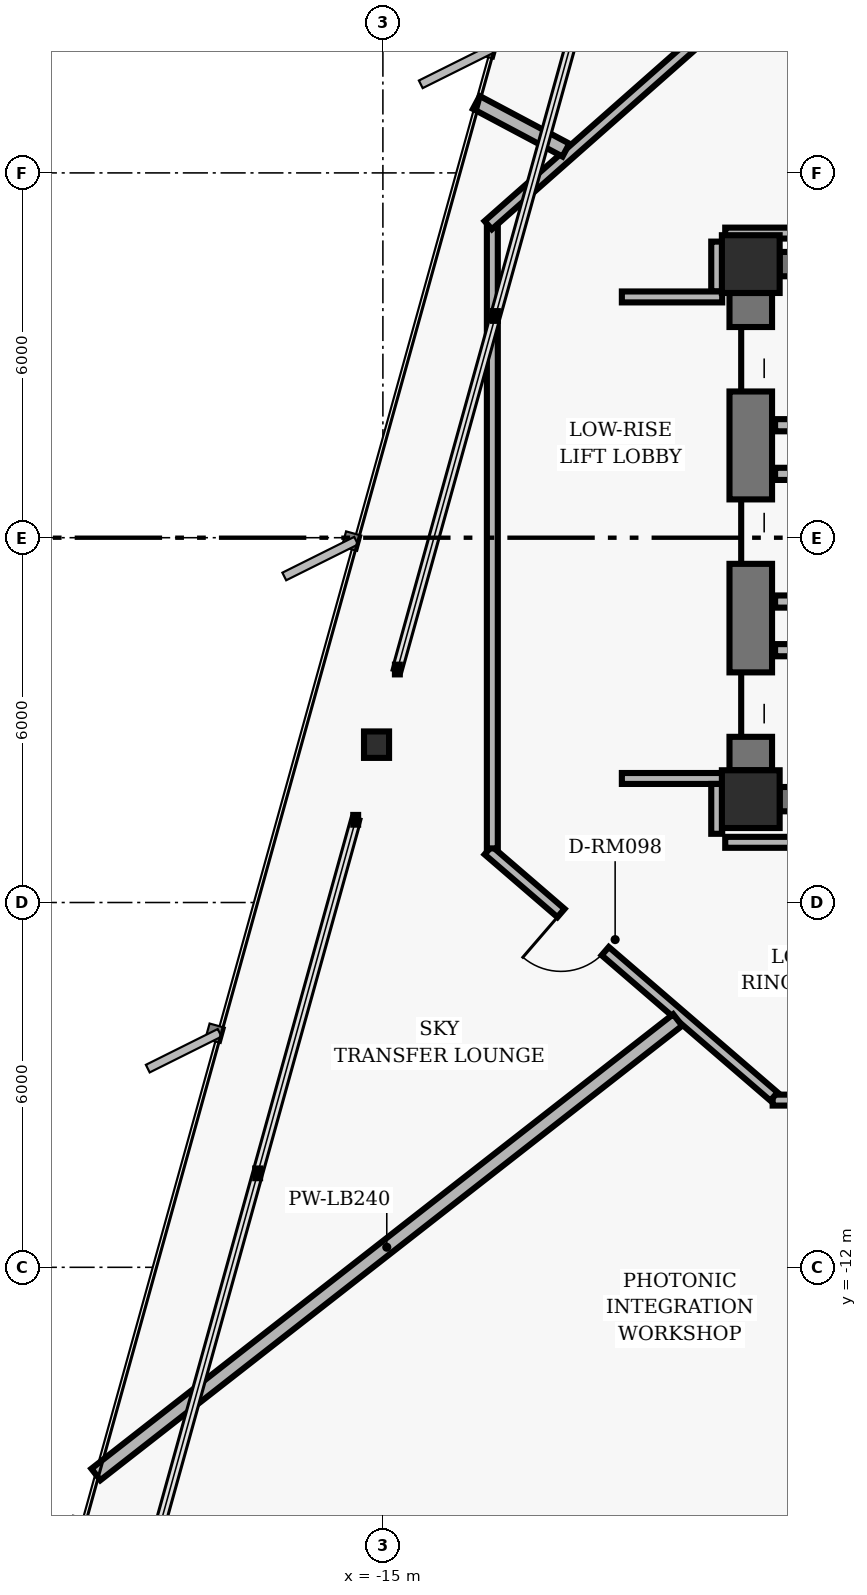
"""IFC4 building model, lengths in metres.
Left out: names, types, materials, properties, quantities, classifications, styles, units other than length and angle.
Written with IfcOpenShell. Run it as: python <this file> out.ifc"""

import sys

from ifc_helpers import new_model, si_unit, direction, frame, frame_2d, origin, origin_2d, place, context, subcontext, project, spatial, rectangle, hollow_rectangle, i_section, extrude, element, fill, save


model = new_model("IFC4")
c1 = context("Model", 3, precision=1e-05, world=origin(), true_north=direction((0.0, 1.0)))
c2 = subcontext(c1, "Body", "Model", "MODEL_VIEW")
j1 = project(units=[si_unit("LENGTHUNIT", "METRE"), si_unit("PLANEANGLEUNIT", "RADIAN")], contexts=[c1])
p1 = place(None, origin())
s1 = spatial("IfcSite", under=j1, at=p1, CompositionType="ELEMENT")
p2 = place(p1, origin())
s2 = spatial("IfcBuilding", under=s1, at=p2, CompositionType="ELEMENT")
p3 = place(p2, frame((0.0, 0.0, 97.76)))
s3 = spatial("IfcBuildingStorey", under=s2, at=p3, CompositionType="ELEMENT", Elevation=97.76)
for number, where, z_axis, x_axis in (
    (1, (-8.95, 4.5, 0.0), (0.0, 0.0, 1.0), (1.0, 0.0, 0.0)),
    (2, (-8.95, -4.3, 0.0), (0.0, 0.0, 1.0), (1.0, 0.0, 0.0)),
):
    element("IfcColumn", number, at=place(p3, frame(where, z_axis=z_axis, x_axis=x_axis)), inside=s3, PredefinedType="COLUMN", context=c2, shape_type="SweptSolid", body=[
        extrude(hollow_rectangle(XDim=0.95, YDim=0.95, WallThickness=0.06, InnerFilletRadius=0.02, OuterFilletRadius=0.04, at=origin_2d()), origin(), (0.0, 0.0, 1.0), 3.04),
    ])
p4 = place(p3, frame((-8.95, -3.825, 0.0), z_axis=(0.0, 0.0, 1.0), x_axis=(0.0, 1.0, 0.0)))
e3 = element("IfcWall", 3, at=p4, inside=s3, PredefinedType="SHEAR", context=c2, shape_type="SweptSolid", body=[
    extrude(rectangle(XDim=7.85, YDim=0.7, at=frame_2d((3.925, 0.0))), origin(), (0.0, 0.0, 1.0), 2.718),
])
p5 = place(p4, frame((0.55, 0.0, 0.0)))
e4 = element("IfcOpeningElement", 4, at=p5, cuts=e3, PredefinedType="OPENING", context=c2, shape_type="SweptSolid", body=[
    extrude(rectangle(XDim=1.06, YDim=2.04, at=frame_2d((0.53, 1.02))), frame((0.0, 0.36, 0.0), z_axis=(0.0, -1.0, 0.0), x_axis=(1.0, 0.0, 0.0)), (0.0, 0.0, 1.0), 0.72),
])
p6 = place(p4, frame((3.395, 0.0, 0.0)))
e5 = element("IfcOpeningElement", 5, at=p6, cuts=e3, PredefinedType="OPENING", context=c2, shape_type="SweptSolid", body=[
    extrude(rectangle(XDim=1.06, YDim=2.04, at=frame_2d((0.53, 1.02))), frame((0.0, 0.36, 0.0), z_axis=(0.0, -1.0, 0.0), x_axis=(1.0, 0.0, 0.0)), (0.0, 0.0, 1.0), 0.72),
])
p7 = place(p4, frame((6.23, 0.0, 0.0)))
e6 = element("IfcOpeningElement", 6, at=p7, cuts=e3, PredefinedType="OPENING", context=c2, shape_type="SweptSolid", body=[
    extrude(rectangle(XDim=1.06, YDim=2.04, at=frame_2d((0.53, 1.02))), frame((0.0, 0.36, 0.0), z_axis=(0.0, -1.0, 0.0), x_axis=(1.0, 0.0, 0.0)), (0.0, 0.0, 1.0), 0.72),
])
for number, where, z_axis, x_axis in (
    (7, (-8.475, 4.5, 0.0), (0.0, 0.0, 1.0), (1.0, 0.0, 0.0)),
    (8, (-8.475, -4.3, 0.0), (0.0, 0.0, 1.0), (1.0, 0.0, 0.0)),
):
    element("IfcWall", number, at=place(p3, frame(where, z_axis=z_axis, x_axis=x_axis)), inside=s3, PredefinedType="SHEAR", context=c2, shape_type="SweptSolid", body=[
        extrude(rectangle(XDim=1.95, YDim=0.4, at=frame_2d((0.975, 0.0))), origin(), (0.0, 0.0, 1.0), 2.718),
    ])
p8 = place(p3, frame((-15.104, -3.404, 0.0), z_axis=(0.0, 0.0, 1.0), x_axis=(1.0, 0.0, 0.0)))
e9 = element("IfcColumn", 9, at=p8, inside=s3, PredefinedType="COLUMN", context=c2, shape_type="SweptSolid", body=[
    extrude(i_section(OverallWidth=0.412, OverallDepth=0.435, WebThickness=0.036, FlangeThickness=0.057, FilletRadius=0.022, at=origin_2d()), origin(), (0.0, 0.0, 1.0), 3.04),
])
for number, where, z_axis, x_axis in (
    (10, (-8.55, -1.85, 0.0), (0.0, 0.0, 1.0), (1.0, 0.0, 0.0)),
    (11, (-8.55, 1.85, 0.0), (0.0, 0.0, 1.0), (1.0, 0.0, 0.0)),
):
    element("IfcWall", number, at=place(p3, frame(where, z_axis=z_axis, x_axis=x_axis)), inside=s3, PredefinedType="PARTITIONING", context=c2, shape_type="SweptSolid", body=[
        extrude(rectangle(XDim=2.1, YDim=0.2, at=frame_2d((1.05, 0.0))), origin(), (0.0, 0.0, 1.0), 2.693),
    ])
for number, where, z_axis, x_axis in (
    (12, (-8.55, -1.05, 0.0), (0.0, 0.0, 1.0), (1.0, 0.0, 0.0)),
    (13, (-8.55, 1.05, 0.0), (0.0, 0.0, 1.0), (1.0, 0.0, 0.0)),
):
    element("IfcWall", number, at=place(p3, frame(where, z_axis=z_axis, x_axis=x_axis)), inside=s3, PredefinedType="PARTITIONING", context=c2, shape_type="SweptSolid", body=[
        extrude(rectangle(XDim=1.91, YDim=0.2, at=frame_2d((0.955, 0.0))), origin(), (0.0, 0.0, 1.0), 2.693),
    ])
p9 = place(p3, frame((8.41, -9.25, 0.0), z_axis=(0.0, 0.0, 1.0), x_axis=(-1.0, 0.0, 0.0)))
e14 = element("IfcWall", 14, at=p9, inside=s3, PredefinedType="PARTITIONING", context=c2, shape_type="SweptSolid", body=[
    extrude(rectangle(XDim=17.0, YDim=0.18, at=frame_2d((8.5, 0.0))), origin(), (0.0, 0.0, 1.0), 2.207),
])
p10 = place(p9, frame((10.181, 0.0, 0.0)))
e15 = element("IfcOpeningElement", 15, at=p10, cuts=e14, PredefinedType="OPENING", context=c2, shape_type="SweptSolid", body=[
    extrude(rectangle(XDim=1.02, YDim=2.02, at=frame_2d((0.51, 1.01))), frame((0.0, 0.1, 0.0), z_axis=(0.0, -1.0, 0.0), x_axis=(1.0, 0.0, 0.0)), (0.0, 0.0, 1.0), 0.2),
])
p11 = place(p3, frame((-8.568, -9.191, 0.0), z_axis=(0.0, 0.0, 1.0), x_axis=(-0.757556899173, 0.652769135694, 0.0)))
e16 = element("IfcWall", 16, at=p11, inside=s3, PredefinedType="PARTITIONING", context=c2, shape_type="SweptSolid", body=[
    extrude(rectangle(XDim=6.204, YDim=0.18, at=frame_2d((3.102, 0.0))), origin(), (0.0, 0.0, 1.0), 2.693),
])
p12 = place(p11, frame((3.664, 0.0, 0.0)))
e17 = element("IfcOpeningElement", 17, at=p12, cuts=e16, PredefinedType="OPENING", context=c2, shape_type="SweptSolid", body=[
    extrude(rectangle(XDim=0.96, YDim=2.02, at=frame_2d((0.48, 1.01))), frame((0.0, 0.1, 0.0), z_axis=(0.0, -1.0, 0.0), x_axis=(1.0, 0.0, 0.0)), (0.0, 0.0, 1.0), 0.2),
])
p13 = place(p3, frame((-13.2, -5.11, 0.0), z_axis=(0.0, 0.0, 1.0), x_axis=(0.0, 1.0, 0.0)))
e18 = element("IfcWall", 18, at=p13, inside=s3, PredefinedType="PARTITIONING", context=c2, shape_type="SweptSolid", body=[
    extrude(rectangle(XDim=10.22, YDim=0.18, at=frame_2d((5.11, 0.0))), origin(), (0.0, 0.0, 1.0), 2.073),
])
p14 = place(p3, frame((-13.268, 5.14, 0.0), z_axis=(0.0, 0.0, 1.0), x_axis=(0.749626463267, 0.66186113768, 0.0)))
e19 = element("IfcWall", 19, at=p14, inside=s3, PredefinedType="PARTITIONING", context=c2, shape_type="SweptSolid", body=[
    extrude(rectangle(XDim=6.27, YDim=0.18, at=frame_2d((3.135, 0.0))), origin(), (0.0, 0.0, 1.0), 2.693),
])
p15 = place(p3, frame((-9.51, 4.87, 0.0), z_axis=(0.0, 0.0, 1.0), x_axis=(0.0, -1.0, 0.0)))
e20 = element("IfcWall", 20, at=p15, inside=s3, PredefinedType="PARTITIONING", context=c2, shape_type="SweptSolid", body=[
    extrude(rectangle(XDim=0.82, YDim=0.18, at=frame_2d((0.41, 0.0))), origin(), (0.0, 0.0, 1.0), 2.207),
])
p16 = place(p3, frame((-9.42, 3.96, 0.0), z_axis=(0.0, 0.0, 1.0), x_axis=(-1.0, 0.0, 0.0)))
e21 = element("IfcWall", 21, at=p16, inside=s3, PredefinedType="PARTITIONING", context=c2, shape_type="SweptSolid", body=[
    extrude(rectangle(XDim=1.65, YDim=0.18, at=frame_2d((0.825, 0.0))), origin(), (0.0, 0.0, 1.0), 2.693),
])
p17 = place(p3, frame((-11.07, -3.96, 0.0), z_axis=(0.0, 0.0, 1.0), x_axis=(1.0, 0.0, 0.0)))
e22 = element("IfcWall", 22, at=p17, inside=s3, PredefinedType="PARTITIONING", context=c2, shape_type="SweptSolid", body=[
    extrude(rectangle(XDim=1.65, YDim=0.18, at=frame_2d((0.825, 0.0))), origin(), (0.0, 0.0, 1.0), 1.978),
])
p18 = place(p3, frame((-9.51, -4.05, 0.0), z_axis=(0.0, 0.0, 1.0), x_axis=(0.0, -1.0, 0.0)))
e23 = element("IfcWall", 23, at=p18, inside=s3, PredefinedType="PARTITIONING", context=c2, shape_type="SweptSolid", body=[
    extrude(rectangle(XDim=0.82, YDim=0.18, at=frame_2d((0.41, 0.0))), origin(), (0.0, 0.0, 1.0), 2.693),
])
p19 = place(p3, frame((-9.37, -5.01, 0.0), z_axis=(0.0, 0.0, 1.0), x_axis=(1.0, 0.0, 0.0)))
e24 = element("IfcWall", 24, at=p19, inside=s3, PredefinedType="PARTITIONING", context=c2, shape_type="SweptSolid", body=[
    extrude(rectangle(XDim=3.34, YDim=0.18, at=frame_2d((1.67, 0.0))), origin(), (0.0, 0.0, 1.0), 2.693),
])
p20 = place(p3, frame((-6.562, 5.01, 0.0), z_axis=(0.0, 0.0, 1.0), x_axis=(-1.0, 0.0, 0.0)))
e25 = element("IfcWall", 25, at=p20, inside=s3, PredefinedType="PARTITIONING", context=c2, shape_type="SweptSolid", body=[
    extrude(rectangle(XDim=2.808, YDim=0.18, at=frame_2d((1.404, 0.0))), origin(), (0.0, 0.0, 1.0), 2.693),
])
p21 = place(p3, frame((-10.152, -7.932, 0.0), z_axis=(0.0, 0.0, 1.0), x_axis=(-0.788016447684, -0.61565418717, 0.0)))
e26 = element("IfcWall", 26, at=p21, inside=s3, PredefinedType="PARTITIONING", context=c2, shape_type="SweptSolid", body=[
    extrude(rectangle(XDim=12.142, YDim=0.24, at=frame_2d((6.071, 0.0))), origin(), (0.0, 0.0, 1.0), 1.978),
])
p22 = place(p3, frame((-11.99, 6.375, 0.0), z_axis=(0.0, 0.0, 1.0), x_axis=(-0.882931788889, 0.469501284524, 0.0)))
e27 = element("IfcWall", 27, at=p22, inside=s3, PredefinedType="PARTITIONING", context=c2, shape_type="SweptSolid", body=[
    extrude(rectangle(XDim=1.668, YDim=0.24, at=frame_2d((0.834, 0.0))), origin(), (0.0, 0.0, 1.0), 2.693),
])
p23 = place(p5, origin())
e28 = element("IfcDoor", 28, at=p23, inside=s3, OperationType="SLIDING_TO_LEFT", PredefinedType="DOOR", context=c2, shape_type="SweptSolid", body=[
    extrude(rectangle(XDim=1.06, YDim=2.04, at=frame_2d((0.53, 1.02))), frame((0.0, 0.025, 0.0), z_axis=(0.0, -1.0, 0.0), x_axis=(1.0, 0.0, 0.0)), (0.0, 0.0, 1.0), 0.05),
])
fill(e4, e28)
p24 = place(p6, origin())
e29 = element("IfcDoor", 29, at=p24, inside=s3, OperationType="SLIDING_TO_RIGHT", PredefinedType="DOOR", context=c2, shape_type="SweptSolid", body=[
    extrude(rectangle(XDim=1.06, YDim=2.04, at=frame_2d((0.53, 1.02))), frame((0.0, 0.025, 0.0), z_axis=(0.0, -1.0, 0.0), x_axis=(1.0, 0.0, 0.0)), (0.0, 0.0, 1.0), 0.05),
])
fill(e5, e29)
p25 = place(p7, origin())
e30 = element("IfcDoor", 30, at=p25, inside=s3, OperationType="SLIDING_TO_LEFT", PredefinedType="DOOR", context=c2, shape_type="SweptSolid", body=[
    extrude(rectangle(XDim=1.06, YDim=2.04, at=frame_2d((0.53, 1.02))), frame((0.0, 0.025, 0.0), z_axis=(0.0, -1.0, 0.0), x_axis=(1.0, 0.0, 0.0)), (0.0, 0.0, 1.0), 0.05),
])
fill(e6, e30)
p26 = place(p12, origin())
e31 = element("IfcDoor", 31, at=p26, inside=s3, OperationType="SINGLE_SWING_RIGHT", PredefinedType="DOOR", context=c2, shape_type="SweptSolid", body=[
    extrude(rectangle(XDim=0.96, YDim=2.02, at=frame_2d((0.48, 1.01))), frame((0.0, 0.025, 0.0), z_axis=(0.0, -1.0, 0.0), x_axis=(1.0, 0.0, 0.0)), (0.0, 0.0, 1.0), 0.05),
])
fill(e17, e31)
save(model, sys.argv[1])
